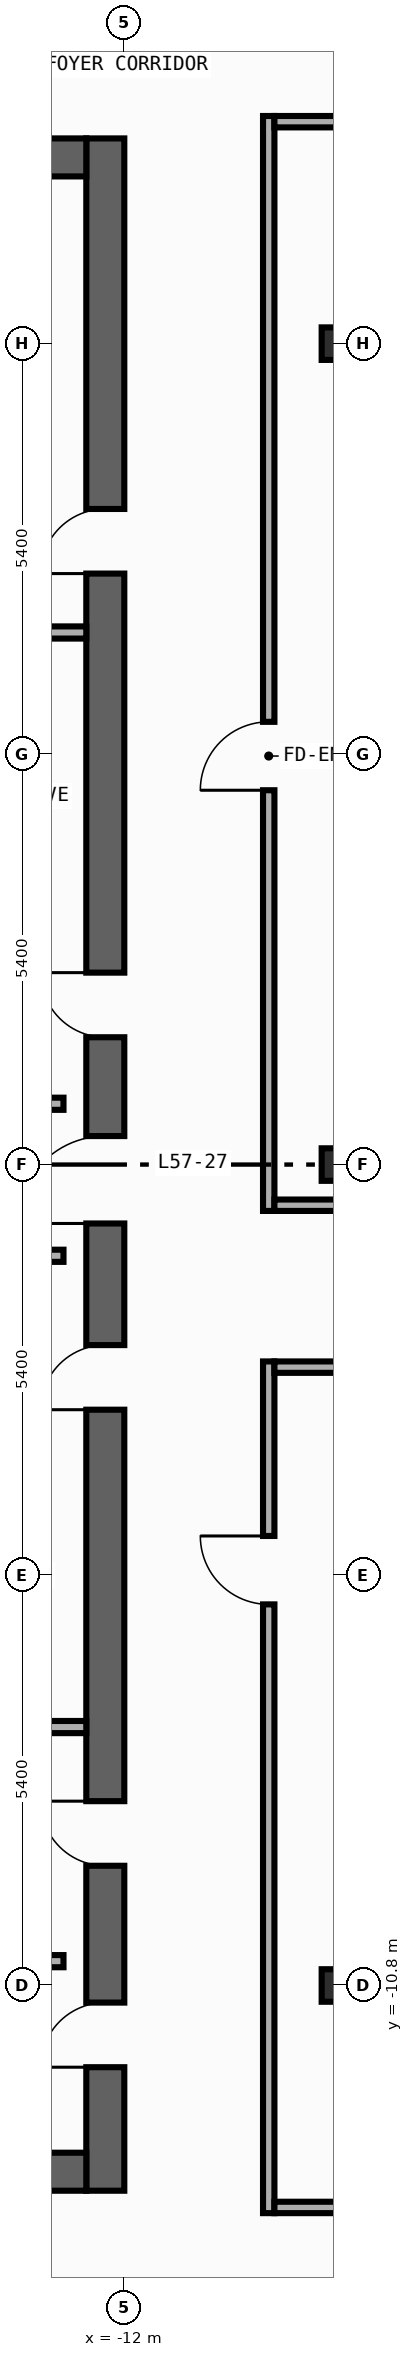
"""IFC4 building model, lengths in metres.
Left out: names, types, materials, properties, quantities, classifications, styles, units other than length and angle.
Written with IfcOpenShell. Run it as: python <this file> out.ifc"""

import sys

from ifc_helpers import new_model, si_unit, direction, frame, frame_2d, origin, origin_2d, place, context, subcontext, project, spatial, rectangle, i_section, extrude, element, fill, save


model = new_model("IFC4")
c1 = context("Model", 3, precision=1e-05, world=origin(), true_north=direction((0.0, 1.0)))
c2 = subcontext(c1, "Body", "Model", "MODEL_VIEW")
j1 = project(units=[si_unit("LENGTHUNIT", "METRE"), si_unit("PLANEANGLEUNIT", "RADIAN")], contexts=[c1])
p1 = place(None, origin())
s1 = spatial("IfcSite", under=j1, at=p1, CompositionType="ELEMENT")
p2 = place(p1, origin())
s2 = spatial("IfcBuilding", under=s1, at=p2, CompositionType="ELEMENT")
p3 = place(p2, frame((0.0, 0.0, 244.0)))
s3 = spatial("IfcBuildingStorey", under=s2, at=p3, CompositionType="ELEMENT", Elevation=244.0)
p4 = place(p3, frame((-12.25, -13.5, 0.0), z_axis=(0.0, 0.0, 1.0), x_axis=(0.0, 1.0, 0.0)))
e1 = element("IfcWall", 1, at=p4, inside=s3, PredefinedType="SHEAR", context=c2, shape_type="SweptSolid", body=[
    extrude(rectangle(XDim=27.0, YDim=0.5, at=frame_2d((13.5, 0.0))), origin(), (0.0, 0.0, 1.0), 3.34),
])
p5 = place(p4, frame((15.175, 0.0, 0.0)))
e2 = element("IfcOpeningElement", 2, at=p5, cuts=e1, PredefinedType="OPENING", context=c2, shape_type="SweptSolid", body=[
    extrude(rectangle(XDim=0.85, YDim=2.1, at=frame_2d((0.425, 1.05))), frame((0.0, 0.26, 0.0), z_axis=(0.0, -1.0, 0.0), x_axis=(1.0, 0.0, 0.0)), (0.0, 0.0, 1.0), 0.52),
])
p6 = place(p4, frame((21.275, 0.0, 0.0)))
e3 = element("IfcOpeningElement", 3, at=p6, cuts=e1, PredefinedType="OPENING", context=c2, shape_type="SweptSolid", body=[
    extrude(rectangle(XDim=0.85, YDim=2.1, at=frame_2d((0.425, 1.05))), frame((0.0, 0.26, 0.0), z_axis=(0.0, -1.0, 0.0), x_axis=(1.0, 0.0, 0.0)), (0.0, 0.0, 1.0), 0.52),
])
p7 = place(p4, frame((4.275, 0.0, 0.0)))
e4 = element("IfcOpeningElement", 4, at=p7, cuts=e1, PredefinedType="OPENING", context=c2, shape_type="SweptSolid", body=[
    extrude(rectangle(XDim=0.85, YDim=2.1, at=frame_2d((0.425, 1.05))), frame((0.0, 0.26, 0.0), z_axis=(0.0, -1.0, 0.0), x_axis=(1.0, 0.0, 0.0)), (0.0, 0.0, 1.0), 0.52),
])
p8 = place(p4, frame((10.275, 0.0, 0.0)))
e5 = element("IfcOpeningElement", 5, at=p8, cuts=e1, PredefinedType="OPENING", context=c2, shape_type="SweptSolid", body=[
    extrude(rectangle(XDim=0.85, YDim=2.1, at=frame_2d((0.425, 1.05))), frame((0.0, 0.26, 0.0), z_axis=(0.0, -1.0, 0.0), x_axis=(1.0, 0.0, 0.0)), (0.0, 0.0, 1.0), 0.52),
])
p9 = place(p4, frame((12.725, 0.0, 0.0)))
e6 = element("IfcOpeningElement", 6, at=p9, cuts=e1, PredefinedType="OPENING", context=c2, shape_type="SweptSolid", body=[
    extrude(rectangle(XDim=1.15, YDim=2.2, at=frame_2d((0.575, 1.1))), frame((0.0, 0.26, 0.0), z_axis=(0.0, -1.0, 0.0), x_axis=(1.0, 0.0, 0.0)), (0.0, 0.0, 1.0), 0.52),
])
p10 = place(p4, frame((1.625, 0.0, 0.0)))
e7 = element("IfcOpeningElement", 7, at=p10, cuts=e1, PredefinedType="OPENING", context=c2, shape_type="SweptSolid", body=[
    extrude(rectangle(XDim=0.85, YDim=2.1, at=frame_2d((0.425, 1.05))), frame((0.0, 0.26, 0.0), z_axis=(0.0, -1.0, 0.0), x_axis=(1.0, 0.0, 0.0)), (0.0, 0.0, 1.0), 0.52),
])
for number, where, z_axis, x_axis in (
    (8, (-19.9, -13.25, 0.0), (0.0, 0.0, 1.0), (1.0, 0.0, 0.0)),
    (9, (-19.9, 13.25, 0.0), (0.0, 0.0, 1.0), (1.0, 0.0, 0.0)),
):
    element("IfcWall", number, at=place(p3, frame(where, z_axis=z_axis, x_axis=x_axis)), inside=s3, PredefinedType="SHEAR", context=c2, shape_type="SweptSolid", body=[
        extrude(rectangle(XDim=7.4, YDim=0.5, at=frame_2d((3.7, 0.0))), origin(), (0.0, 0.0, 1.0), 3.34),
    ])
for number, where, z_axis, x_axis in (
    (10, (-9.2, -10.8, 0.0), (0.0, 0.0, 1.0), (1.0, 0.0, 0.0)),
    (11, (-9.2, 0.0, 0.0), (0.0, 0.0, 1.0), (1.0, 0.0, 0.0)),
    (12, (-9.2, 10.8, 0.0), (0.0, 0.0, 1.0), (1.0, 0.0, 0.0)),
):
    element("IfcColumn", number, at=place(p3, frame(where, z_axis=z_axis, x_axis=x_axis)), inside=s3, PredefinedType="COLUMN", context=c2, shape_type="SweptSolid", body=[
        extrude(i_section(OverallWidth=0.407, OverallDepth=0.428, WebThickness=0.02, FlangeThickness=0.035, FilletRadius=0.022, at=origin_2d()), origin(), (0.0, 0.0, 1.0), 3.6),
    ])
for number, where, z_axis, x_axis in (
    (13, (-15.4, 0.8, 0.0), (0.0, 0.0, 1.0), (1.0, 0.0, 0.0)),
    (14, (-15.4, -1.2, 0.0), (0.0, 0.0, 1.0), (1.0, 0.0, 0.0)),
    (15, (-15.4, -10.48, 0.0), (0.0, 0.0, 1.0), (1.0, 0.0, 0.0)),
):
    element("IfcWall", number, at=place(p3, frame(where, z_axis=z_axis, x_axis=x_axis)), inside=s3, PredefinedType="STANDARD", context=c2, shape_type="SweptSolid", body=[
        extrude(rectangle(XDim=2.6, YDim=0.16, at=frame_2d((1.3, 0.0))), origin(), (0.0, 0.0, 1.0), 3.34),
    ])
for number, where, z_axis, x_axis in (
    (16, (-15.4, 7.0, 0.0), (0.0, 0.0, 1.0), (1.0, 0.0, 0.0)),
    (17, (-15.4, -7.4, 0.0), (0.0, 0.0, 1.0), (1.0, 0.0, 0.0)),
):
    element("IfcWall", number, at=place(p3, frame(where, z_axis=z_axis, x_axis=x_axis)), inside=s3, PredefinedType="PARTITIONING", context=c2, shape_type="SweptSolid", body=[
        extrude(rectangle(XDim=2.9, YDim=0.16, at=frame_2d((1.45, 0.0))), origin(), (0.0, 0.0, 1.0), 3.34),
    ])
p11 = place(p3, frame((-10.1, -0.61, 0.0), z_axis=(0.0, 0.0, 1.0), x_axis=(0.0, 1.0, 0.0)))
e18 = element("IfcWall", 18, at=p11, inside=s3, PredefinedType="PARTITIONING", context=c2, shape_type="SweptSolid", body=[
    extrude(rectangle(XDim=14.405, YDim=0.15, at=frame_2d((7.203, 0.0))), origin(), (0.0, 0.0, 1.0), 3.34),
])
p12 = place(p11, frame((5.535, 0.0, 0.0)))
e19 = element("IfcOpeningElement", 19, at=p12, cuts=e18, PredefinedType="OPENING", context=c2, shape_type="SweptSolid", body=[
    extrude(rectangle(XDim=0.9, YDim=2.15, at=frame_2d((0.45, 1.075))), frame((0.0, 0.085, 0.0), z_axis=(0.0, -1.0, 0.0), x_axis=(1.0, 0.0, 0.0)), (0.0, 0.0, 1.0), 0.17),
])
p13 = place(p3, frame((-10.1, -13.795, 0.0), z_axis=(0.0, 0.0, 1.0), x_axis=(0.0, 1.0, 0.0)))
e20 = element("IfcWall", 20, at=p13, inside=s3, PredefinedType="PARTITIONING", context=c2, shape_type="SweptSolid", body=[
    extrude(rectangle(XDim=11.205, YDim=0.15, at=frame_2d((5.603, 0.0))), origin(), (0.0, 0.0, 1.0), 3.34),
])
p14 = place(p13, frame((8.009, 0.0, 0.0)))
e21 = element("IfcOpeningElement", 21, at=p14, cuts=e20, PredefinedType="OPENING", context=c2, shape_type="SweptSolid", body=[
    extrude(rectangle(XDim=0.9, YDim=2.15, at=frame_2d((0.45, 1.075))), frame((0.0, 0.085, 0.0), z_axis=(0.0, -1.0, 0.0), x_axis=(1.0, 0.0, 0.0)), (0.0, 0.0, 1.0), 0.17),
])
p15 = place(p3, frame((-10.025, -0.535, 0.0), z_axis=(0.0, 0.0, 1.0), x_axis=(1.0, 0.0, 0.0)))
e22 = element("IfcWall", 22, at=p15, inside=s3, PredefinedType="PARTITIONING", context=c2, shape_type="SweptSolid", body=[
    extrude(rectangle(XDim=7.835, YDim=0.15, at=frame_2d((3.917, 0.0))), origin(), (0.0, 0.0, 1.0), 3.34),
])
p16 = place(p15, frame((6.475, 0.0, 0.0)))
e23 = element("IfcOpeningElement", 23, at=p16, cuts=e22, PredefinedType="OPENING", context=c2, shape_type="SweptSolid", body=[
    extrude(rectangle(XDim=0.9, YDim=2.15, at=frame_2d((0.45, 1.075))), frame((0.0, 0.085, 0.0), z_axis=(0.0, -1.0, 0.0), x_axis=(1.0, 0.0, 0.0)), (0.0, 0.0, 1.0), 0.17),
])
p17 = place(p3, frame((-10.025, -2.665, 0.0), z_axis=(0.0, 0.0, 1.0), x_axis=(1.0, 0.0, 0.0)))
e24 = element("IfcWall", 24, at=p17, inside=s3, PredefinedType="PARTITIONING", context=c2, shape_type="SweptSolid", body=[
    extrude(rectangle(XDim=7.855, YDim=0.15, at=frame_2d((3.927, 0.0))), origin(), (0.0, 0.0, 1.0), 3.34),
])
p18 = place(p17, frame((6.495, 0.0, 0.0)))
e25 = element("IfcOpeningElement", 25, at=p18, cuts=e24, PredefinedType="OPENING", context=c2, shape_type="SweptSolid", body=[
    extrude(rectangle(XDim=0.9, YDim=2.15, at=frame_2d((0.45, 1.075))), frame((0.0, 0.085, 0.0), z_axis=(0.0, -1.0, 0.0), x_axis=(1.0, 0.0, 0.0)), (0.0, 0.0, 1.0), 0.17),
])
p19 = place(p3, frame((-10.025, 13.72, 0.0), z_axis=(0.0, 0.0, 1.0), x_axis=(1.0, 0.0, 0.0)))
e26 = element("IfcWall", 26, at=p19, inside=s3, PredefinedType="PARTITIONING", context=c2, shape_type="SweptSolid", body=[
    extrude(rectangle(XDim=7.685, YDim=0.15, at=frame_2d((3.842, 0.0))), origin(), (0.0, 0.0, 1.0), 3.34),
])
p20 = place(p19, frame((6.325, 0.0, 0.0)))
e27 = element("IfcOpeningElement", 27, at=p20, cuts=e26, PredefinedType="OPENING", context=c2, shape_type="SweptSolid", body=[
    extrude(rectangle(XDim=0.9, YDim=2.15, at=frame_2d((0.45, 1.075))), frame((0.0, 0.085, 0.0), z_axis=(0.0, -1.0, 0.0), x_axis=(1.0, 0.0, 0.0)), (0.0, 0.0, 1.0), 0.17),
])
p21 = place(p3, frame((-10.025, -13.72, 0.0), z_axis=(0.0, 0.0, 1.0), x_axis=(1.0, 0.0, 0.0)))
e28 = element("IfcWall", 28, at=p21, inside=s3, PredefinedType="PARTITIONING", context=c2, shape_type="SweptSolid", body=[
    extrude(rectangle(XDim=7.855, YDim=0.15, at=frame_2d((3.927, 0.0))), origin(), (0.0, 0.0, 1.0), 3.34),
])
p22 = place(p21, frame((6.495, 0.0, 0.0)))
e29 = element("IfcOpeningElement", 29, at=p22, cuts=e28, PredefinedType="OPENING", context=c2, shape_type="SweptSolid", body=[
    extrude(rectangle(XDim=0.9, YDim=2.15, at=frame_2d((0.45, 1.075))), frame((0.0, 0.085, 0.0), z_axis=(0.0, -1.0, 0.0), x_axis=(1.0, 0.0, 0.0)), (0.0, 0.0, 1.0), 0.17),
])
p23 = place(p5, origin())
e30 = element("IfcDoor", 30, at=p23, inside=s3, OperationType="SINGLE_SWING_RIGHT", PredefinedType="DOOR", context=c2, shape_type="SweptSolid", body=[
    extrude(rectangle(XDim=0.85, YDim=2.1, at=frame_2d((0.425, 1.05))), frame((0.0, 0.025, 0.0), z_axis=(0.0, -1.0, 0.0), x_axis=(1.0, 0.0, 0.0)), (0.0, 0.0, 1.0), 0.05),
])
fill(e2, e30)
p24 = place(p6, origin())
e31 = element("IfcDoor", 31, at=p24, inside=s3, OperationType="SINGLE_SWING_LEFT", PredefinedType="DOOR", context=c2, shape_type="SweptSolid", body=[
    extrude(rectangle(XDim=0.85, YDim=2.1, at=frame_2d((0.425, 1.05))), frame((0.0, 0.025, 0.0), z_axis=(0.0, -1.0, 0.0), x_axis=(1.0, 0.0, 0.0)), (0.0, 0.0, 1.0), 0.05),
])
fill(e3, e31)
p25 = place(p7, origin())
e32 = element("IfcDoor", 32, at=p25, inside=s3, OperationType="SINGLE_SWING_RIGHT", PredefinedType="DOOR", context=c2, shape_type="SweptSolid", body=[
    extrude(rectangle(XDim=0.85, YDim=2.1, at=frame_2d((0.425, 1.05))), frame((0.0, 0.025, 0.0), z_axis=(0.0, -1.0, 0.0), x_axis=(1.0, 0.0, 0.0)), (0.0, 0.0, 1.0), 0.05),
])
fill(e4, e32)
p26 = place(p8, origin())
e33 = element("IfcDoor", 33, at=p26, inside=s3, OperationType="SINGLE_SWING_LEFT", PredefinedType="DOOR", context=c2, shape_type="SweptSolid", body=[
    extrude(rectangle(XDim=0.85, YDim=2.1, at=frame_2d((0.425, 1.05))), frame((0.0, 0.025, 0.0), z_axis=(0.0, -1.0, 0.0), x_axis=(1.0, 0.0, 0.0)), (0.0, 0.0, 1.0), 0.05),
])
fill(e5, e33)
p27 = place(p9, origin())
e34 = element("IfcDoor", 34, at=p27, inside=s3, OperationType="SINGLE_SWING_LEFT", PredefinedType="DOOR", context=c2, shape_type="SweptSolid", body=[
    extrude(rectangle(XDim=1.15, YDim=2.2, at=frame_2d((0.575, 1.1))), frame((0.0, 0.025, 0.0), z_axis=(0.0, -1.0, 0.0), x_axis=(1.0, 0.0, 0.0)), (0.0, 0.0, 1.0), 0.05),
])
fill(e6, e34)
p28 = place(p10, origin())
e35 = element("IfcDoor", 35, at=p28, inside=s3, OperationType="SINGLE_SWING_LEFT", PredefinedType="DOOR", context=c2, shape_type="SweptSolid", body=[
    extrude(rectangle(XDim=0.85, YDim=2.1, at=frame_2d((0.425, 1.05))), frame((0.0, 0.025, 0.0), z_axis=(0.0, -1.0, 0.0), x_axis=(1.0, 0.0, 0.0)), (0.0, 0.0, 1.0), 0.05),
])
fill(e7, e35)
p29 = place(p12, origin())
e36 = element("IfcDoor", 36, at=p29, inside=s3, OperationType="SINGLE_SWING_LEFT", PredefinedType="DOOR", context=c2, shape_type="SweptSolid", body=[
    extrude(rectangle(XDim=0.9, YDim=2.15, at=frame_2d((0.45, 1.075))), frame((0.0, 0.025, 0.0), z_axis=(0.0, -1.0, 0.0), x_axis=(1.0, 0.0, 0.0)), (0.0, 0.0, 1.0), 0.05),
])
fill(e19, e36)
p30 = place(p14, origin())
e37 = element("IfcDoor", 37, at=p30, inside=s3, OperationType="SINGLE_SWING_RIGHT", PredefinedType="DOOR", context=c2, shape_type="SweptSolid", body=[
    extrude(rectangle(XDim=0.9, YDim=2.15, at=frame_2d((0.45, 1.075))), frame((0.0, 0.025, 0.0), z_axis=(0.0, -1.0, 0.0), x_axis=(1.0, 0.0, 0.0)), (0.0, 0.0, 1.0), 0.05),
])
fill(e21, e37)
save(model, sys.argv[1])
